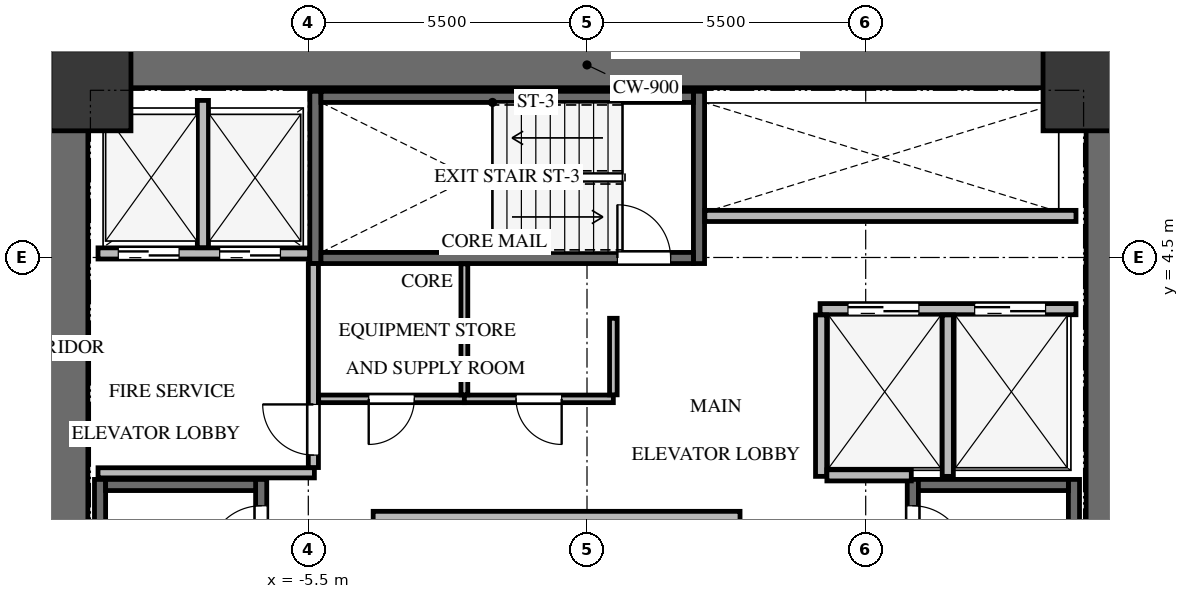
"""IFC4 building model, lengths in metres.
Left out: names, types, materials, properties, quantities, classifications, styles, units other than length and angle.
Written with IfcOpenShell. Run it as: python <this file> out.ifc"""

import sys

from ifc_helpers import new_model, si_unit, direction, frame, frame_2d, origin, origin_2d, place, context, subcontext, project, spatial, rectangle, extrude, source, transform, mapped, element, fill, save


model = new_model("IFC4")
c1 = context("Model", 3, precision=1e-05, world=origin(), true_north=direction((0.0, 1.0)))
c2 = subcontext(c1, "Body", "Model", "MODEL_VIEW")
j1 = project(units=[si_unit("LENGTHUNIT", "METRE"), si_unit("PLANEANGLEUNIT", "RADIAN")], contexts=[c1])
p1 = place(None, origin())
s1 = spatial("IfcSite", under=j1, at=p1, CompositionType="ELEMENT")
p2 = place(p1, origin())
s2 = spatial("IfcBuilding", under=s1, at=p2, CompositionType="ELEMENT")
p3 = place(p2, frame((0.0, 0.0, 48.9)))
s3 = spatial("IfcBuildingStorey", under=s2, at=p3, CompositionType="ELEMENT", Elevation=48.9)
for number, where, z_axis, x_axis in (
    (1, (-10.3, -8.75, 0.0), (0.0, 0.0, 1.0), (0.0, 1.0, 0.0)),
    (2, (10.3, -8.75, 0.0), (0.0, 0.0, 1.0), (0.0, 1.0, 0.0)),
):
    element("IfcWall", number, at=place(p3, frame(where, z_axis=z_axis, x_axis=x_axis)), inside=s3, PredefinedType="SHEAR", context=c2, shape_type="SweptSolid", body=[
        extrude(rectangle(XDim=17.5, YDim=0.9, at=frame_2d((8.75, 0.0))), origin(), (0.0, 0.0, 1.0), 3.3),
    ])
p4 = place(p3, frame((-9.85, 8.3, 0.0), z_axis=(0.0, 0.0, 1.0), x_axis=(1.0, 0.0, 0.0)))
e3 = element("IfcWall", 3, at=p4, inside=s3, PredefinedType="SHEAR", context=c2, shape_type="SweptSolid", body=[
    extrude(rectangle(XDim=19.7, YDim=0.9, at=frame_2d((9.85, 0.0))), origin(), (0.0, 0.0, 1.0), 3.3),
])
p5 = place(p3, frame((-6.43, -7.77, -0.24), z_axis=(0.0, 0.0, 1.0), x_axis=(0.0, 1.0, 0.0)))
e4 = element("IfcWall", 4, at=p5, inside=s3, PredefinedType="SHEAR", context=c2, shape_type="SweptSolid", body=[
    extrude(rectangle(XDim=7.89, YDim=0.22, at=frame_2d((3.945, 0.0))), origin(), (0.0, 0.0, 1.0), 3.3),
])
p6 = place(p5, frame((6.32, 0.0, 0.0)))
e5 = element("IfcOpeningElement", 5, at=p6, cuts=e4, PredefinedType="OPENING", context=c2, shape_type="SweptSolid", body=[
    extrude(rectangle(XDim=1.05, YDim=2.15, at=frame_2d((0.525, 1.075))), frame((0.0, 0.12, 0.0), z_axis=(0.0, -1.0, 0.0), x_axis=(1.0, 0.0, 0.0)), (0.0, 0.0, 1.0), 0.24),
])
p7 = place(p3, frame((-9.61, 0.12, -0.24), z_axis=(0.0, 0.0, 1.0), x_axis=(0.0, -1.0, 0.0)))
e6 = element("IfcWall", 6, at=p7, inside=s3, PredefinedType="SHEAR", context=c2, shape_type="SweptSolid", body=[
    extrude(rectangle(XDim=7.89, YDim=0.22, at=frame_2d((3.945, 0.0))), origin(), (0.0, 0.0, 1.0), 3.3),
])
p8 = place(p3, frame((-6.54, 0.01, -0.24), z_axis=(0.0, 0.0, 1.0), x_axis=(-1.0, 0.0, 0.0)))
e7 = element("IfcWall", 7, at=p8, inside=s3, PredefinedType="SHEAR", context=c2, shape_type="SweptSolid", body=[
    extrude(rectangle(XDim=2.96, YDim=0.22, at=frame_2d((1.48, 0.0))), origin(), (0.0, 0.0, 1.0), 3.3),
])
p9 = place(p3, frame((9.61, -7.77, -0.24), z_axis=(0.0, 0.0, 1.0), x_axis=(0.0, 1.0, 0.0)))
e8 = element("IfcWall", 8, at=p9, inside=s3, PredefinedType="SHEAR", context=c2, shape_type="SweptSolid", body=[
    extrude(rectangle(XDim=7.89, YDim=0.22, at=frame_2d((3.945, 0.0))), origin(), (0.0, 0.0, 1.0), 3.3),
])
p10 = place(p3, frame((6.43, 0.12, -0.24), z_axis=(0.0, 0.0, 1.0), x_axis=(0.0, -1.0, 0.0)))
e9 = element("IfcWall", 9, at=p10, inside=s3, PredefinedType="SHEAR", context=c2, shape_type="SweptSolid", body=[
    extrude(rectangle(XDim=7.89, YDim=0.22, at=frame_2d((3.945, 0.0))), origin(), (0.0, 0.0, 1.0), 3.3),
])
p11 = place(p10, frame((0.52, 0.0, 0.0)))
e10 = element("IfcOpeningElement", 10, at=p11, cuts=e9, PredefinedType="OPENING", context=c2, shape_type="SweptSolid", body=[
    extrude(rectangle(XDim=1.05, YDim=2.15, at=frame_2d((0.525, 1.075))), frame((0.0, 0.12, 0.0), z_axis=(0.0, -1.0, 0.0), x_axis=(1.0, 0.0, 0.0)), (0.0, 0.0, 1.0), 0.24),
])
p12 = place(p3, frame((9.5, 0.01, -0.24), z_axis=(0.0, 0.0, 1.0), x_axis=(-1.0, 0.0, 0.0)))
e11 = element("IfcWall", 11, at=p12, inside=s3, PredefinedType="SHEAR", context=c2, shape_type="SweptSolid", body=[
    extrude(rectangle(XDim=2.96, YDim=0.22, at=frame_2d((1.48, 0.0))), origin(), (0.0, 0.0, 1.0), 3.3),
])
for number, where, z_axis, x_axis in (
    (12, (2.21, 4.38, -0.24), (0.0, 0.0, 1.0), (0.0, 1.0, 0.0)),
    (13, (-5.36, 7.78, -0.24), (0.0, 0.0, 1.0), (0.0, -1.0, 0.0)),
):
    element("IfcWall", number, at=place(p3, frame(where, z_axis=z_axis, x_axis=x_axis)), inside=s3, PredefinedType="SHEAR", context=c2, shape_type="SweptSolid", body=[
        extrude(rectangle(XDim=3.4, YDim=0.22, at=frame_2d((1.7, 0.0))), origin(), (0.0, 0.0, 1.0), 3.3),
    ])
p13 = place(p3, frame((-5.25, 4.49, -0.24), z_axis=(0.0, 0.0, 1.0), x_axis=(1.0, 0.0, 0.0)))
e14 = element("IfcWall", 14, at=p13, inside=s3, PredefinedType="SHEAR", context=c2, shape_type="SweptSolid", body=[
    extrude(rectangle(XDim=7.35, YDim=0.22, at=frame_2d((3.675, 0.0))), origin(), (0.0, 0.0, 1.0), 3.3),
])
p14 = place(p13, frame((5.85, 0.0, 0.0)))
e15 = element("IfcOpeningElement", 15, at=p14, cuts=e14, PredefinedType="OPENING", context=c2, shape_type="SweptSolid", body=[
    extrude(rectangle(XDim=1.05, YDim=2.15, at=frame_2d((0.525, 1.075))), frame((0.0, 0.12, 0.0), z_axis=(0.0, -1.0, 0.0), x_axis=(1.0, 0.0, 0.0)), (0.0, 0.0, 1.0), 0.24),
])
p15 = place(p3, frame((2.1, 7.67, -0.24), z_axis=(0.0, 0.0, 1.0), x_axis=(-1.0, 0.0, 0.0)))
e16 = element("IfcWall", 16, at=p15, inside=s3, PredefinedType="SHEAR", context=c2, shape_type="SweptSolid", body=[
    extrude(rectangle(XDim=7.35, YDim=0.22, at=frame_2d((3.675, 0.0))), origin(), (0.0, 0.0, 1.0), 3.3),
])
m1 = source(origin(), c2, "Body", "SweptSolid", [
    extrude(rectangle(XDim=1.6, YDim=1.6, at=origin_2d()), origin(), (0.0, 0.0, 1.0), 3.3),
])
for number, where, z_axis, x_axis in (
    (17, (9.8, 7.8, -0.24), (0.0, 0.0, 1.0), (1.0, 0.0, 0.0)),
    (18, (-9.8, 7.8, -0.24), (0.0, 0.0, 1.0), (1.0, 0.0, 0.0)),
):
    element("IfcColumn", number, at=place(p3, frame(where, z_axis=z_axis, x_axis=x_axis)), inside=s3, PredefinedType="COLUMN", context=c2, shape_type="MappedRepresentation", body=[
        mapped(m1, transform((0.0, 0.0, 0.0), x_axis=(1.0, 0.0, 0.0), y_axis=(0.0, 1.0, 0.0), z_axis=(0.0, 0.0, 1.0), scale=1.0)),
    ])
p16 = place(p3, frame((-9.65, 4.58, 0.0), z_axis=(0.0, 0.0, 1.0), x_axis=(1.0, 0.0, 0.0)))
e19 = element("IfcWall", 19, at=p16, inside=s3, PredefinedType="SOLIDWALL", context=c2, shape_type="SweptSolid", body=[
    extrude(rectangle(XDim=4.175, YDim=0.22, at=frame_2d((2.087, 0.0))), origin(), (0.0, 0.0, 1.0), 3.045),
])
p17 = place(p16, frame((0.4, 0.0, 0.0)))
e20 = element("IfcOpeningElement", 20, at=p17, cuts=e19, PredefinedType="OPENING", context=c2, shape_type="SweptSolid", body=[
    extrude(rectangle(XDim=1.2, YDim=2.15, at=frame_2d((0.6, 1.075))), frame((0.0, 0.12, 0.0), z_axis=(0.0, -1.0, 0.0), x_axis=(1.0, 0.0, 0.0)), (0.0, 0.0, 1.0), 0.24),
])
p18 = place(p16, frame((2.4, 0.0, 0.0)))
e21 = element("IfcOpeningElement", 21, at=p18, cuts=e19, PredefinedType="OPENING", context=c2, shape_type="SweptSolid", body=[
    extrude(rectangle(XDim=1.2, YDim=2.15, at=frame_2d((0.6, 1.075))), frame((0.0, 0.12, 0.0), z_axis=(0.0, -1.0, 0.0), x_axis=(1.0, 0.0, 0.0)), (0.0, 0.0, 1.0), 0.24),
])
p19 = place(p3, frame((-7.58, 4.694, 0.0), z_axis=(0.0, 0.0, 1.0), x_axis=(0.0, 1.0, 0.0)))
e22 = element("IfcWall", 22, at=p19, inside=s3, PredefinedType="SOLIDWALL", context=c2, shape_type="SweptSolid", body=[
    extrude(rectangle(XDim=2.906, YDim=0.22, at=frame_2d((1.453, 0.0))), origin(), (0.0, 0.0, 1.0), 3.045),
])
p20 = place(p3, frame((-9.65, 0.25, 0.0), z_axis=(0.0, 0.0, 1.0), x_axis=(1.0, 0.0, 0.0)))
e23 = element("IfcWall", 23, at=p20, inside=s3, PredefinedType="SOLIDWALL", context=c2, shape_type="SweptSolid", body=[
    extrude(rectangle(XDim=4.27, YDim=0.2, at=frame_2d((2.135, 0.0))), origin(), (0.0, 0.0, 1.0), 3.045),
])
p21 = place(p3, frame((-5.4, 0.354, 0.0), z_axis=(0.0, 0.0, 1.0), x_axis=(0.0, 1.0, 0.0)))
e24 = element("IfcWall", 24, at=p21, inside=s3, PredefinedType="SOLIDWALL", context=c2, shape_type="SweptSolid", body=[
    extrude(rectangle(XDim=4.026, YDim=0.2, at=frame_2d((2.013, 0.0))), origin(), (0.0, 0.0, 1.0), 3.045),
])
p22 = place(p21, frame((0.246, 0.0, 0.0)))
e25 = element("IfcOpeningElement", 25, at=p22, cuts=e24, PredefinedType="OPENING", context=c2, shape_type="SweptSolid", body=[
    extrude(rectangle(XDim=1.0, YDim=2.15, at=frame_2d((0.5, 1.075))), frame((0.0, 0.11, 0.0), z_axis=(0.0, -1.0, 0.0), x_axis=(1.0, 0.0, 0.0)), (0.0, 0.0, 1.0), 0.22),
])
p23 = place(p3, frame((4.6, 3.48, 0.0), z_axis=(0.0, 0.0, 1.0), x_axis=(1.0, 0.0, 0.0)))
e26 = element("IfcWall", 26, at=p23, inside=s3, PredefinedType="SOLIDWALL", context=c2, shape_type="SweptSolid", body=[
    extrude(rectangle(XDim=5.05, YDim=0.22, at=frame_2d((2.525, 0.0))), origin(), (0.0, 0.0, 1.0), 3.045),
])
p24 = place(p23, frame((0.55, 0.0, 0.0)))
e27 = element("IfcOpeningElement", 27, at=p24, cuts=e26, PredefinedType="OPENING", context=c2, shape_type="SweptSolid", body=[
    extrude(rectangle(XDim=1.4, YDim=2.15, at=frame_2d((0.7, 1.075))), frame((0.0, 0.12, 0.0), z_axis=(0.0, -1.0, 0.0), x_axis=(1.0, 0.0, 0.0)), (0.0, 0.0, 1.0), 0.24),
])
p25 = place(p23, frame((3.05, 0.0, 0.0)))
e28 = element("IfcOpeningElement", 28, at=p25, cuts=e26, PredefinedType="OPENING", context=c2, shape_type="SweptSolid", body=[
    extrude(rectangle(XDim=1.4, YDim=2.15, at=frame_2d((0.7, 1.075))), frame((0.0, 0.12, 0.0), z_axis=(0.0, -1.0, 0.0), x_axis=(1.0, 0.0, 0.0)), (0.0, 0.0, 1.0), 0.24),
])
for number, where, z_axis, x_axis in (
    (29, (4.62, 0.18, 0.0), (0.0, 0.0, 1.0), (0.0, 1.0, 0.0)),
    (30, (7.12, 0.18, 0.0), (0.0, 0.0, 1.0), (0.0, 1.0, 0.0)),
):
    element("IfcWall", number, at=place(p3, frame(where, z_axis=z_axis, x_axis=x_axis)), inside=s3, PredefinedType="SOLIDWALL", context=c2, shape_type="SweptSolid", body=[
        extrude(rectangle(XDim=3.186, YDim=0.22, at=frame_2d((1.593, 0.0))), origin(), (0.0, 0.0, 1.0), 3.045),
    ])
p26 = place(p3, frame((4.734, 0.2, 0.0), z_axis=(0.0, 0.0, 1.0), x_axis=(1.0, 0.0, 0.0)))
e31 = element("IfcWall", 31, at=p26, inside=s3, PredefinedType="SOLIDWALL", context=c2, shape_type="SweptSolid", body=[
    extrude(rectangle(XDim=1.666, YDim=0.22, at=frame_2d((0.833, 0.0))), origin(), (0.0, 0.0, 1.0), 3.045),
])
p27 = place(p3, frame((-4.22, -0.62, 0.0), z_axis=(0.0, 0.0, 1.0), x_axis=(1.0, 0.0, 0.0)))
e32 = element("IfcWall", 32, at=p27, inside=s3, PredefinedType="SOLIDWALL", context=c2, shape_type="SweptSolid", body=[
    extrude(rectangle(XDim=7.24, YDim=0.22, at=frame_2d((3.62, 0.0))), origin(), (0.0, 0.0, 1.0), 3.045),
])
p28 = place(p3, frame((2.325, 5.32, 0.0), z_axis=(0.0, 0.0, 1.0), x_axis=(1.0, 0.0, 0.0)))
e33 = element("IfcWall", 33, at=p28, inside=s3, PredefinedType="SOLIDWALL", context=c2, shape_type="SweptSolid", body=[
    extrude(rectangle(XDim=7.325, YDim=0.22, at=frame_2d((3.663, 0.0))), origin(), (0.0, 0.0, 1.0), 3.045),
])
p29 = place(p3, frame((-2.42, 1.71, 0.0), z_axis=(0.0, 0.0, 1.0), x_axis=(-1.0, 0.0, 0.0)))
e34 = element("IfcWall", 34, at=p29, inside=s3, PredefinedType="PARTITIONING", context=c2, shape_type="SweptSolid", body=[
    extrude(rectangle(XDim=2.876, YDim=0.15, at=frame_2d((1.438, 0.0))), origin(), (0.0, 0.0, 1.0), 3.045),
])
p30 = place(p29, frame((0.988, 0.0, 0.0)))
e35 = element("IfcOpeningElement", 35, at=p30, cuts=e34, PredefinedType="OPENING", context=c2, shape_type="SweptSolid", body=[
    extrude(rectangle(XDim=0.9, YDim=2.05, at=frame_2d((0.45, 1.025))), frame((0.0, 0.085, 0.0), z_axis=(0.0, -1.0, 0.0), x_axis=(1.0, 0.0, 0.0)), (0.0, 0.0, 1.0), 0.17),
])
p31 = place(p3, frame((0.52, 1.71, 0.0), z_axis=(0.0, 0.0, 1.0), x_axis=(-1.0, 0.0, 0.0)))
e36 = element("IfcWall", 36, at=p31, inside=s3, PredefinedType="PARTITIONING", context=c2, shape_type="SweptSolid", body=[
    extrude(rectangle(XDim=2.94, YDim=0.15, at=frame_2d((1.47, 0.0))), origin(), (0.0, 0.0, 1.0), 3.045),
])
p32 = place(p31, frame((1.02, 0.0, 0.0)))
e37 = element("IfcOpeningElement", 37, at=p32, cuts=e36, PredefinedType="OPENING", context=c2, shape_type="SweptSolid", body=[
    extrude(rectangle(XDim=0.9, YDim=2.05, at=frame_2d((0.45, 1.025))), frame((0.0, 0.085, 0.0), z_axis=(0.0, -1.0, 0.0), x_axis=(1.0, 0.0, 0.0)), (0.0, 0.0, 1.0), 0.17),
])
p33 = place(p3, frame((0.52, 3.3, 0.0), z_axis=(0.0, 0.0, 1.0), x_axis=(0.0, -1.0, 0.0)))
e38 = element("IfcWall", 38, at=p33, inside=s3, PredefinedType="PARTITIONING", context=c2, shape_type="SweptSolid", body=[
    extrude(rectangle(XDim=1.511, YDim=0.15, at=frame_2d((0.755, 0.0))), origin(), (0.0, 0.0, 1.0), 3.045),
])
p34 = place(p3, frame((-2.42, 4.375, 0.0), z_axis=(0.0, 0.0, 1.0), x_axis=(0.0, -1.0, 0.0)))
e39 = element("IfcWall", 39, at=p34, inside=s3, PredefinedType="PARTITIONING", context=c2, shape_type="SweptSolid", body=[
    extrude(rectangle(XDim=2.586, YDim=0.135, at=frame_2d((1.293, 0.0))), origin(), (0.0, 0.0, 1.0), 3.045),
])
m2 = source(origin(), c2, "Body", "SweptSolid", [
    extrude(rectangle(XDim=1.05, YDim=2.15, at=frame_2d((0.525, 1.075))), frame((0.0, 0.025, 0.0), z_axis=(0.0, -1.0, 0.0), x_axis=(1.0, 0.0, 0.0)), (0.0, 0.0, 1.0), 0.05),
])
p35 = place(p6, origin())
e40 = element("IfcDoor", 40, at=p35, inside=s3, OperationType="SINGLE_SWING_LEFT", PredefinedType="DOOR", context=c2, shape_type="MappedRepresentation", body=[
    mapped(m2, transform((0.0, 0.0, 0.0), x_axis=(1.0, 0.0, 0.0), y_axis=(0.0, 1.0, 0.0), z_axis=(0.0, 0.0, 1.0), scale=1.0)),
])
fill(e5, e40)
m3 = source(origin(), c2, "Body", "SweptSolid", [
    extrude(rectangle(XDim=1.05, YDim=2.15, at=frame_2d((0.525, 1.075))), frame((0.0, 0.025, 0.0), z_axis=(0.0, -1.0, 0.0), x_axis=(1.0, 0.0, 0.0)), (0.0, 0.0, 1.0), 0.05),
])
p36 = place(p11, origin())
e41 = element("IfcDoor", 41, at=p36, inside=s3, OperationType="SINGLE_SWING_RIGHT", PredefinedType="DOOR", context=c2, shape_type="MappedRepresentation", body=[
    mapped(m3, transform((0.0, 0.0, 0.0), x_axis=(1.0, 0.0, 0.0), y_axis=(0.0, 1.0, 0.0), z_axis=(0.0, 0.0, 1.0), scale=1.0)),
])
fill(e10, e41)
p37 = place(p14, origin())
e42 = element("IfcDoor", 42, at=p37, inside=s3, OperationType="SINGLE_SWING_LEFT", PredefinedType="DOOR", context=c2, shape_type="MappedRepresentation", body=[
    mapped(m2, transform((0.0, 0.0, 0.0), x_axis=(1.0, 0.0, 0.0), y_axis=(0.0, 1.0, 0.0), z_axis=(0.0, 0.0, 1.0), scale=1.0)),
])
fill(e15, e42)
m4 = source(origin(), c2, "Body", "SweptSolid", [
    extrude(rectangle(XDim=1.2, YDim=2.15, at=frame_2d((0.6, 1.075))), frame((0.0, 0.025, 0.0), z_axis=(0.0, -1.0, 0.0), x_axis=(1.0, 0.0, 0.0)), (0.0, 0.0, 1.0), 0.05),
])
p38 = place(p17, origin())
e43 = element("IfcDoor", 43, at=p38, inside=s3, OperationType="DOUBLE_DOOR_SLIDING", PredefinedType="DOOR", context=c2, shape_type="MappedRepresentation", body=[
    mapped(m4, transform((0.0, 0.0, 0.0), x_axis=(1.0, 0.0, 0.0), y_axis=(0.0, 1.0, 0.0), z_axis=(0.0, 0.0, 1.0), scale=1.0)),
])
fill(e20, e43)
p39 = place(p18, origin())
e44 = element("IfcDoor", 44, at=p39, inside=s3, OperationType="DOUBLE_DOOR_SLIDING", PredefinedType="DOOR", context=c2, shape_type="MappedRepresentation", body=[
    mapped(m4, transform((0.0, 0.0, 0.0), x_axis=(1.0, 0.0, 0.0), y_axis=(0.0, 1.0, 0.0), z_axis=(0.0, 0.0, 1.0), scale=1.0)),
])
fill(e21, e44)
m5 = source(origin(), c2, "Body", "SweptSolid", [
    extrude(rectangle(XDim=1.0, YDim=2.15, at=frame_2d((0.5, 1.075))), frame((0.0, 0.025, 0.0), z_axis=(0.0, -1.0, 0.0), x_axis=(1.0, 0.0, 0.0)), (0.0, 0.0, 1.0), 0.05),
])
p40 = place(p22, origin())
e45 = element("IfcDoor", 45, at=p40, inside=s3, OperationType="SINGLE_SWING_RIGHT", PredefinedType="DOOR", context=c2, shape_type="MappedRepresentation", body=[
    mapped(m5, transform((0.0, 0.0, 0.0), x_axis=(1.0, 0.0, 0.0), y_axis=(0.0, 1.0, 0.0), z_axis=(0.0, 0.0, 1.0), scale=1.0)),
])
fill(e25, e45)
m6 = source(origin(), c2, "Body", "SweptSolid", [
    extrude(rectangle(XDim=1.4, YDim=2.15, at=frame_2d((0.7, 1.075))), frame((0.0, 0.025, 0.0), z_axis=(0.0, -1.0, 0.0), x_axis=(1.0, 0.0, 0.0)), (0.0, 0.0, 1.0), 0.05),
])
p41 = place(p24, origin())
e46 = element("IfcDoor", 46, at=p41, inside=s3, OperationType="DOUBLE_DOOR_SLIDING", PredefinedType="DOOR", context=c2, shape_type="MappedRepresentation", body=[
    mapped(m6, transform((0.0, 0.0, 0.0), x_axis=(1.0, 0.0, 0.0), y_axis=(0.0, 1.0, 0.0), z_axis=(0.0, 0.0, 1.0), scale=1.0)),
])
fill(e27, e46)
p42 = place(p25, origin())
e47 = element("IfcDoor", 47, at=p42, inside=s3, OperationType="DOUBLE_DOOR_SLIDING", PredefinedType="DOOR", context=c2, shape_type="MappedRepresentation", body=[
    mapped(m6, transform((0.0, 0.0, 0.0), x_axis=(1.0, 0.0, 0.0), y_axis=(0.0, 1.0, 0.0), z_axis=(0.0, 0.0, 1.0), scale=1.0)),
])
fill(e28, e47)
m7 = source(origin(), c2, "Body", "SweptSolid", [
    extrude(rectangle(XDim=0.9, YDim=2.05, at=frame_2d((0.45, 1.025))), frame((0.0, 0.025, 0.0), z_axis=(0.0, -1.0, 0.0), x_axis=(1.0, 0.0, 0.0)), (0.0, 0.0, 1.0), 0.05),
])
p43 = place(p30, origin())
e48 = element("IfcDoor", 48, at=p43, inside=s3, OperationType="SINGLE_SWING_RIGHT", PredefinedType="DOOR", context=c2, shape_type="MappedRepresentation", body=[
    mapped(m7, transform((0.0, 0.0, 0.0), x_axis=(1.0, 0.0, 0.0), y_axis=(0.0, 1.0, 0.0), z_axis=(0.0, 0.0, 1.0), scale=1.0)),
])
fill(e35, e48)
m8 = source(origin(), c2, "Body", "SweptSolid", [
    extrude(rectangle(XDim=0.9, YDim=2.05, at=frame_2d((0.45, 1.025))), frame((0.0, 0.025, 0.0), z_axis=(0.0, -1.0, 0.0), x_axis=(1.0, 0.0, 0.0)), (0.0, 0.0, 1.0), 0.05),
])
p44 = place(p32, origin())
e49 = element("IfcDoor", 49, at=p44, inside=s3, OperationType="SINGLE_SWING_LEFT", PredefinedType="DOOR", context=c2, shape_type="MappedRepresentation", body=[
    mapped(m8, transform((0.0, 0.0, 0.0), x_axis=(1.0, 0.0, 0.0), y_axis=(0.0, 1.0, 0.0), z_axis=(0.0, 0.0, 1.0), scale=1.0)),
])
fill(e37, e49)
save(model, sys.argv[1])
